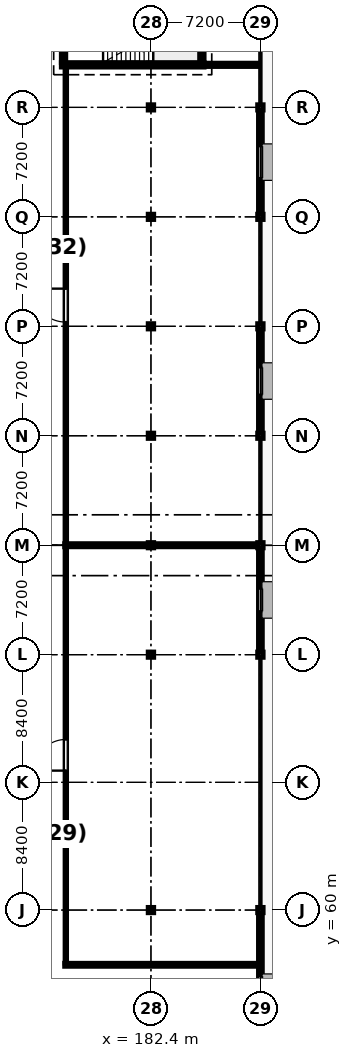
"""IFC4 building model, lengths in metres.
Left out: names, types, materials, properties, quantities, classifications, styles, units other than length and angle.
Written with IfcOpenShell. Run it as: python <this file> out.ifc"""

import sys

from ifc_helpers import new_model, si_unit, direction, frame, frame_2d, origin, origin_2d, place, context, subcontext, project, spatial, rectangle, i_section, extrude, element, fill, save


model = new_model("IFC4")
c1 = context("Model", 3, precision=1e-05, world=origin(), true_north=direction((0.0, 1.0)))
c2 = subcontext(c1, "Body", "Model", "MODEL_VIEW")
j1 = project(units=[si_unit("LENGTHUNIT", "METRE"), si_unit("PLANEANGLEUNIT", "RADIAN")], contexts=[c1])
p1 = place(None, origin())
s1 = spatial("IfcSite", under=j1, at=p1, CompositionType="ELEMENT")
p2 = place(p1, origin())
s2 = spatial("IfcBuilding", under=s1, at=p2, CompositionType="ELEMENT")
p3 = place(p2, frame((0.0, 0.0, 9.3)))
s3 = spatial("IfcBuildingStorey", under=s2, at=p3, CompositionType="ELEMENT", Elevation=9.3)
for number, where, z_axis, x_axis in (
    (1, (182.4, 60.0, 0.0), (0.0, 0.0, 1.0), (1.0, 0.0, 0.0)),
    (2, (182.4, 76.8, 0.0), (0.0, 0.0, 1.0), (1.0, 0.0, 0.0)),
    (3, (182.4, 84.0, 0.0), (0.0, 0.0, 1.0), (1.0, 0.0, 0.0)),
    (4, (182.4, 91.2, 0.0), (0.0, 0.0, 1.0), (1.0, 0.0, 0.0)),
    (5, (182.4, 98.4, 0.0), (0.0, 0.0, 1.0), (1.0, 0.0, 0.0)),
    (6, (182.4, 105.6, 0.0), (0.0, 0.0, 1.0), (1.0, 0.0, 0.0)),
    (7, (182.4, 112.8, 0.0), (0.0, 0.0, 1.0), (1.0, 0.0, 0.0)),
    (8, (189.6, 60.0, 0.0), (0.0, 0.0, 1.0), (1.0, 0.0, 0.0)),
    (9, (189.6, 76.8, 0.0), (0.0, 0.0, 1.0), (1.0, 0.0, 0.0)),
    (10, (189.6, 84.0, 0.0), (0.0, 0.0, 1.0), (1.0, 0.0, 0.0)),
    (11, (189.6, 91.2, 0.0), (0.0, 0.0, 1.0), (1.0, 0.0, 0.0)),
    (12, (189.6, 98.4, 0.0), (0.0, 0.0, 1.0), (1.0, 0.0, 0.0)),
    (13, (189.6, 105.6, 0.0), (0.0, 0.0, 1.0), (1.0, 0.0, 0.0)),
    (14, (189.6, 112.8, 0.0), (0.0, 0.0, 1.0), (1.0, 0.0, 0.0)),
):
    element("IfcColumn", number, at=place(p3, frame(where, z_axis=z_axis, x_axis=x_axis)), inside=s3, PredefinedType="COLUMN", context=c2, shape_type="SweptSolid", body=[
        extrude(i_section(OverallWidth=0.368, OverallDepth=0.356, WebThickness=0.011, FlangeThickness=0.018, FilletRadius=0.015, at=origin_2d()), origin(), (0.0, 0.0, 1.0), 3.9),
    ])
p4 = place(p3, frame((189.6, 59.82, 0.0), z_axis=(0.0, 0.0, 1.0), x_axis=(0.0, -1.0, 0.0)))
e15 = element("IfcWall", 15, at=p4, inside=s3, PredefinedType="STANDARD", context=c2, shape_type="SweptSolid", body=[
    extrude(rectangle(XDim=10.44, YDim=0.26, at=frame_2d((5.22, 0.0))), origin(), (0.0, 0.0, 1.0), 2.828),
])
p5 = place(p4, frame((4.17, 0.0, 0.9)))
e16 = element("IfcOpeningElement", 16, at=p5, cuts=e15, PredefinedType="OPENING", context=c2, shape_type="SweptSolid", body=[
    extrude(rectangle(XDim=2.1, YDim=1.5, at=frame_2d((1.05, 0.75))), frame((0.0, 0.14, 0.0), z_axis=(0.0, -1.0, 0.0), x_axis=(1.0, 0.0, 0.0)), (0.0, 0.0, 1.0), 0.28),
])
p6 = place(p3, frame((189.6, 83.82, 0.0), z_axis=(0.0, 0.0, 1.0), x_axis=(0.0, -1.0, 0.0)))
e17 = element("IfcWall", 17, at=p6, inside=s3, PredefinedType="STANDARD", context=c2, shape_type="SweptSolid", body=[
    extrude(rectangle(XDim=6.84, YDim=0.26, at=frame_2d((3.42, 0.0))), origin(), (0.0, 0.0, 1.0), 2.828),
])
p7 = place(p6, frame((2.67, 0.0, 0.9)))
e18 = element("IfcOpeningElement", 18, at=p7, cuts=e17, PredefinedType="OPENING", context=c2, shape_type="SweptSolid", body=[
    extrude(rectangle(XDim=1.5, YDim=1.5, at=frame_2d((0.75, 0.75))), frame((0.0, 0.14, 0.0), z_axis=(0.0, -1.0, 0.0), x_axis=(1.0, 0.0, 0.0)), (0.0, 0.0, 1.0), 0.28),
])
p8 = place(p3, frame((189.6, 98.22, 0.0), z_axis=(0.0, 0.0, 1.0), x_axis=(0.0, -1.0, 0.0)))
e19 = element("IfcWall", 19, at=p8, inside=s3, PredefinedType="STANDARD", context=c2, shape_type="SweptSolid", body=[
    extrude(rectangle(XDim=6.84, YDim=0.26, at=frame_2d((3.42, 0.0))), origin(), (0.0, 0.0, 1.0), 2.828),
])
p9 = place(p8, frame((2.52, 0.0, 0.9)))
e20 = element("IfcOpeningElement", 20, at=p9, cuts=e19, PredefinedType="OPENING", context=c2, shape_type="SweptSolid", body=[
    extrude(rectangle(XDim=1.8, YDim=1.5, at=frame_2d((0.9, 0.75))), frame((0.0, 0.14, 0.0), z_axis=(0.0, -1.0, 0.0), x_axis=(1.0, 0.0, 0.0)), (0.0, 0.0, 1.0), 0.28),
])
p10 = place(p3, frame((189.6, 112.62, 0.0), z_axis=(0.0, 0.0, 1.0), x_axis=(0.0, -1.0, 0.0)))
e21 = element("IfcWall", 21, at=p10, inside=s3, PredefinedType="STANDARD", context=c2, shape_type="SweptSolid", body=[
    extrude(rectangle(XDim=6.84, YDim=0.26, at=frame_2d((3.42, 0.0))), origin(), (0.0, 0.0, 1.0), 2.828),
])
p11 = place(p10, frame((2.37, 0.0, 0.9)))
e22 = element("IfcOpeningElement", 22, at=p11, cuts=e21, PredefinedType="OPENING", context=c2, shape_type="SweptSolid", body=[
    extrude(rectangle(XDim=2.1, YDim=1.5, at=frame_2d((1.05, 0.75))), frame((0.0, 0.14, 0.0), z_axis=(0.0, -1.0, 0.0), x_axis=(1.0, 0.0, 0.0)), (0.0, 0.0, 1.0), 0.28),
])
p12 = place(p3, frame((185.9, 115.6, 0.0), z_axis=(0.0, 0.0, 1.0), x_axis=(-1.0, 0.0, 0.0)))
e23 = element("IfcWall", 23, at=p12, inside=s3, PredefinedType="SOLIDWALL", context=c2, shape_type="SweptSolid", body=[
    extrude(rectangle(XDim=9.4, YDim=0.3, at=frame_2d((4.7, 0.0))), origin(), (0.0, 0.0, 1.0), 3.6),
])
p13 = place(p3, frame((176.65, 115.75, 0.0), z_axis=(0.0, 0.0, 1.0), x_axis=(0.0, 1.0, 0.0)))
e24 = element("IfcWall", 24, at=p13, inside=s3, PredefinedType="SOLIDWALL", context=c2, shape_type="SweptSolid", body=[
    extrude(rectangle(XDim=3.6, YDim=0.3, at=frame_2d((1.8, 0.0))), origin(), (0.0, 0.0, 1.0), 3.6),
])
p14 = place(p13, frame((1.2, 0.0, 0.0)))
e25 = element("IfcOpeningElement", 25, at=p14, cuts=e24, PredefinedType="OPENING", context=c2, shape_type="SweptSolid", body=[
    extrude(rectangle(XDim=1.2, YDim=2.2, at=frame_2d((0.6, 1.1))), frame((0.0, 0.16, 0.0), z_axis=(0.0, -1.0, 0.0), x_axis=(1.0, 0.0, 0.0)), (0.0, 0.0, 1.0), 0.32),
])
p15 = place(p3, frame((185.75, 119.35, 0.0), z_axis=(0.0, 0.0, 1.0), x_axis=(0.0, -1.0, 0.0)))
e26 = element("IfcWall", 26, at=p15, inside=s3, PredefinedType="SOLIDWALL", context=c2, shape_type="SweptSolid", body=[
    extrude(rectangle(XDim=3.6, YDim=0.3, at=frame_2d((1.8, 0.0))), origin(), (0.0, 0.0, 1.0), 3.6),
])
p16 = place(p3, frame((189.468, 56.4, 0.0), z_axis=(0.0, 0.0, 1.0), x_axis=(-1.0, 0.0, 0.0)))
e27 = element("IfcWall", 27, at=p16, inside=s3, PredefinedType="PARTITIONING", context=c2, shape_type="SweptSolid", body=[
    extrude(rectangle(XDim=12.748, YDim=0.205, at=frame_2d((6.374, 0.0))), origin(), (0.0, 0.0, 1.0), 2.823),
])
p17 = place(p3, frame((176.72, 84.0, 0.0), z_axis=(0.0, 0.0, 1.0), x_axis=(1.0, 0.0, 0.0)))
e28 = element("IfcWall", 28, at=p17, inside=s3, PredefinedType="PARTITIONING", context=c2, shape_type="SweptSolid", body=[
    extrude(rectangle(XDim=12.748, YDim=0.212, at=frame_2d((6.374, 0.0))), origin(), (0.0, 0.0, 1.0), 2.823),
])
p18 = place(p3, frame((185.902, 115.6, 0.0), z_axis=(0.0, 0.0, 1.0), x_axis=(1.0, 0.0, 0.0)))
e29 = element("IfcWall", 29, at=p18, inside=s3, PredefinedType="PARTITIONING", context=c2, shape_type="SweptSolid", body=[
    extrude(rectangle(XDim=3.566, YDim=0.225, at=frame_2d((1.783, 0.0))), origin(), (0.0, 0.0, 1.0), 2.823),
])
p19 = place(p3, frame((176.8, 56.504, 0.0), z_axis=(0.0, 0.0, 1.0), x_axis=(0.0, 1.0, 0.0)))
e30 = element("IfcWall", 30, at=p19, inside=s3, PredefinedType="PARTITIONING", context=c2, shape_type="SweptSolid", body=[
    extrude(rectangle(XDim=27.388, YDim=0.105, at=frame_2d((13.694, 0.0))), origin(), (0.0, 0.0, 1.0), 2.823),
])
p20 = place(p19, frame((12.669, 0.0, 0.0)))
e31 = element("IfcOpeningElement", 31, at=p20, cuts=e30, PredefinedType="OPENING", context=c2, shape_type="SweptSolid", body=[
    extrude(rectangle(XDim=2.05, YDim=2.34, at=frame_2d((1.025, 1.17))), frame((0.0, 0.062, 0.0), z_axis=(0.0, -1.0, 0.0), x_axis=(1.0, 0.0, 0.0)), (0.0, 0.0, 1.0), 0.125),
])
p21 = place(p3, frame((176.8, 84.108, 0.0), z_axis=(0.0, 0.0, 1.0), x_axis=(0.0, 1.0, 0.0)))
e32 = element("IfcWall", 32, at=p21, inside=s3, PredefinedType="PARTITIONING", context=c2, shape_type="SweptSolid", body=[
    extrude(rectangle(XDim=31.34, YDim=0.11, at=frame_2d((15.67, 0.0))), origin(), (0.0, 0.0, 1.0), 2.823),
])
p22 = place(p21, frame((14.57, 0.0, 0.0)))
e33 = element("IfcOpeningElement", 33, at=p22, cuts=e32, PredefinedType="OPENING", context=c2, shape_type="SweptSolid", body=[
    extrude(rectangle(XDim=2.2, YDim=2.34, at=frame_2d((1.1, 1.17))), frame((0.0, 0.065, 0.0), z_axis=(0.0, -1.0, 0.0), x_axis=(1.0, 0.0, 0.0)), (0.0, 0.0, 1.0), 0.13),
])
p23 = place(p5, origin())
e34 = element("IfcWindow", 34, at=p23, inside=s3, PartitioningType="SINGLE_PANEL", PredefinedType="WINDOW", context=c2, shape_type="SweptSolid", body=[
    extrude(rectangle(XDim=2.1, YDim=1.5, at=frame_2d((1.05, 0.75))), frame((0.0, 0.03, 0.0), z_axis=(0.0, -1.0, 0.0), x_axis=(1.0, 0.0, 0.0)), (0.0, 0.0, 1.0), 0.06),
])
fill(e16, e34)
p24 = place(p7, origin())
e35 = element("IfcWindow", 35, at=p24, inside=s3, PartitioningType="SINGLE_PANEL", PredefinedType="WINDOW", context=c2, shape_type="SweptSolid", body=[
    extrude(rectangle(XDim=1.5, YDim=1.5, at=frame_2d((0.75, 0.75))), frame((0.0, 0.03, 0.0), z_axis=(0.0, -1.0, 0.0), x_axis=(1.0, 0.0, 0.0)), (0.0, 0.0, 1.0), 0.06),
])
fill(e18, e35)
p25 = place(p9, origin())
e36 = element("IfcWindow", 36, at=p25, inside=s3, PartitioningType="SINGLE_PANEL", PredefinedType="WINDOW", context=c2, shape_type="SweptSolid", body=[
    extrude(rectangle(XDim=1.8, YDim=1.5, at=frame_2d((0.9, 0.75))), frame((0.0, 0.03, 0.0), z_axis=(0.0, -1.0, 0.0), x_axis=(1.0, 0.0, 0.0)), (0.0, 0.0, 1.0), 0.06),
])
fill(e20, e36)
p26 = place(p11, origin())
e37 = element("IfcWindow", 37, at=p26, inside=s3, PartitioningType="SINGLE_PANEL", PredefinedType="WINDOW", context=c2, shape_type="SweptSolid", body=[
    extrude(rectangle(XDim=2.1, YDim=1.5, at=frame_2d((1.05, 0.75))), frame((0.0, 0.03, 0.0), z_axis=(0.0, -1.0, 0.0), x_axis=(1.0, 0.0, 0.0)), (0.0, 0.0, 1.0), 0.06),
])
fill(e22, e37)
p27 = place(p20, origin())
e38 = element("IfcDoor", 38, at=p27, inside=s3, OperationType="SINGLE_SWING_LEFT", PredefinedType="DOOR", context=c2, shape_type="SweptSolid", body=[
    extrude(rectangle(XDim=2.05, YDim=2.34, at=frame_2d((1.025, 1.17))), frame((0.0, 0.025, 0.0), z_axis=(0.0, -1.0, 0.0), x_axis=(1.0, 0.0, 0.0)), (0.0, 0.0, 1.0), 0.05),
])
fill(e31, e38)
p28 = place(p22, origin())
e39 = element("IfcDoor", 39, at=p28, inside=s3, OperationType="SINGLE_SWING_RIGHT", PredefinedType="DOOR", context=c2, shape_type="SweptSolid", body=[
    extrude(rectangle(XDim=2.2, YDim=2.34, at=frame_2d((1.1, 1.17))), frame((0.0, 0.025, 0.0), z_axis=(0.0, -1.0, 0.0), x_axis=(1.0, 0.0, 0.0)), (0.0, 0.0, 1.0), 0.05),
])
fill(e33, e39)
save(model, sys.argv[1])
